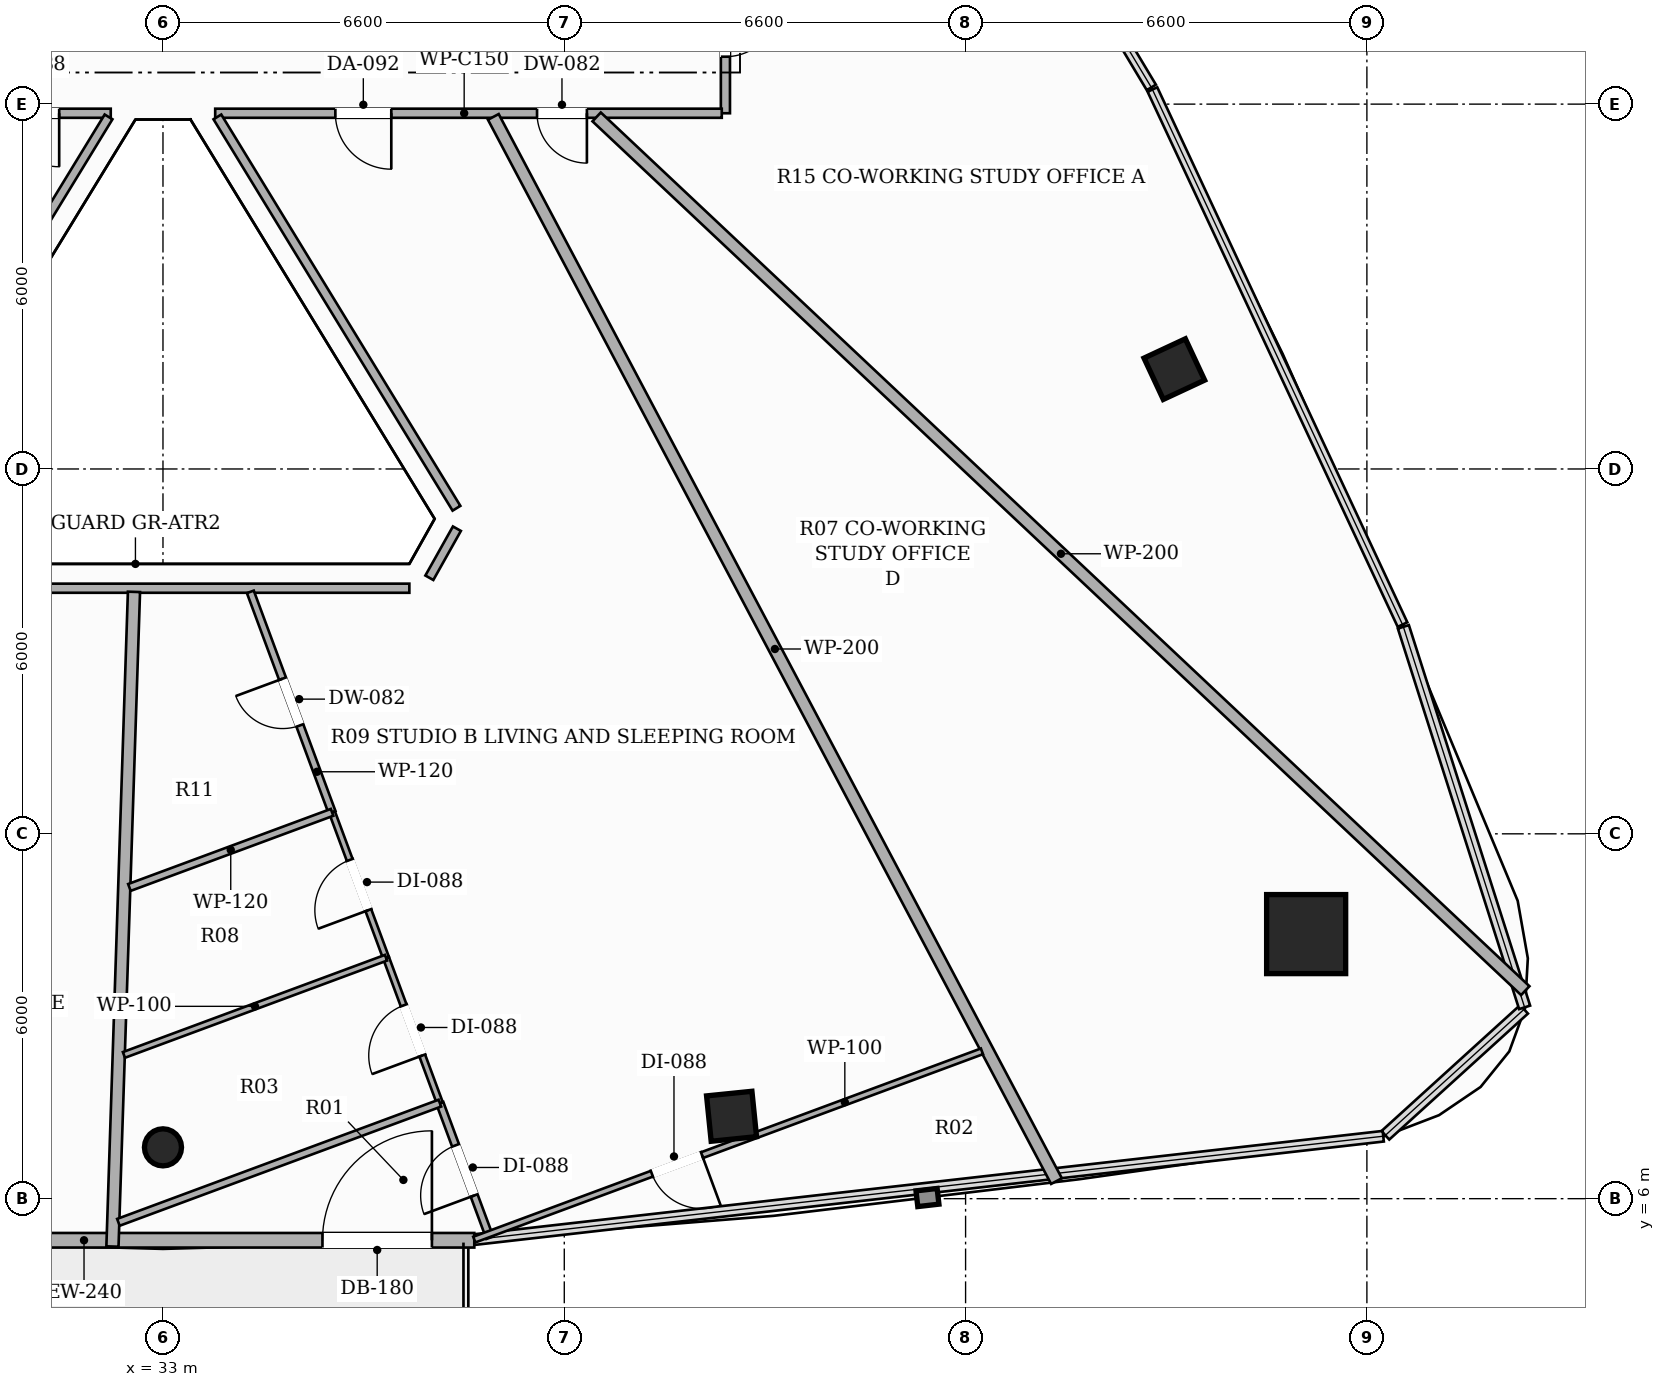
"""IFC4 building model, lengths in metres.
Left out: names, types, materials, properties, quantities, classifications, styles, units other than length and angle.
Written with IfcOpenShell. Run it as: python <this file> out.ifc"""

import sys

from ifc_helpers import new_model, si_unit, direction, frame, frame_2d, origin, origin_2d, place, context, subcontext, project, spatial, rectangle, hollow_rectangle, hollow_circle, extrude, element, fill, save


model = new_model("IFC4")
c1 = context("Model", 3, precision=1e-05, world=origin(), true_north=direction((0.0, 1.0)))
c2 = subcontext(c1, "Body", "Model", "MODEL_VIEW")
j1 = project(units=[si_unit("LENGTHUNIT", "METRE"), si_unit("PLANEANGLEUNIT", "RADIAN")], contexts=[c1])
p1 = place(None, origin())
s1 = spatial("IfcSite", under=j1, at=p1, CompositionType="ELEMENT")
p2 = place(p1, origin())
s2 = spatial("IfcBuilding", under=s1, at=p2, CompositionType="ELEMENT")
p3 = place(p2, frame((0.0, 0.0, 240.35)))
s3 = spatial("IfcBuildingStorey", under=s2, at=p3, CompositionType="ELEMENT", Elevation=240.35)
p4 = place(p3, frame((51.801, 10.351, 0.0), z_axis=(0.0, 0.0, 1.0), x_axis=(1.0, 0.0, 0.0)))
e1 = element("IfcColumn", 1, at=p4, inside=s3, PredefinedType="COLUMN", context=c2, shape_type="SweptSolid", body=[
    extrude(hollow_rectangle(XDim=1.3, YDim=1.3, WallThickness=0.04, at=origin_2d()), origin(), (0.0, 0.0, 1.0), 3.3),
])
p5 = place(p3, frame((33.0, 6.844, 0.0), z_axis=(0.0, 0.0, 1.0), x_axis=(1.0, 0.0, 0.0)))
e2 = element("IfcColumn", 2, at=p5, inside=s3, PredefinedType="COLUMN", context=c2, shape_type="SweptSolid", body=[
    extrude(hollow_circle(Radius=0.305, WallThickness=0.016, at=origin_2d()), origin(), (0.0, 0.0, 1.0), 3.3),
])
for number, where, z_axis, x_axis in (
    (3, (42.351, 7.355, 0.0), (0.0, 0.0, 1.0), (0.995, 0.101, 0.0)),
    (4, (49.633, 19.642, 0.0), (0.0, 0.0, 1.0), (-0.423, 0.906, 0.0)),
):
    element("IfcColumn", number, at=place(p3, frame(where, z_axis=z_axis, x_axis=x_axis)), inside=s3, PredefinedType="COLUMN", context=c2, shape_type="SweptSolid", body=[
        extrude(hollow_rectangle(XDim=0.75, YDim=0.75, WallThickness=0.025, at=origin_2d()), origin(), (0.0, 0.0, 1.0), 3.3),
    ])
p6 = place(p3, frame((27.88, 5.316, 0.0), z_axis=(0.0, 0.0, 1.0), x_axis=(1.0, 0.0, 0.0)))
e5 = element("IfcWall", 5, at=p6, inside=s3, PredefinedType="SOLIDWALL", context=c2, shape_type="SweptSolid", body=[
    extrude(rectangle(XDim=10.24, YDim=0.24, at=frame_2d((5.12, 0.0))), origin(), (0.0, 0.0, 1.0), 2.624),
])
p7 = place(p6, frame((7.743, 0.0, 0.0)))
e6 = element("IfcOpeningElement", 6, at=p7, cuts=e5, PredefinedType="OPENING", context=c2, shape_type="SweptSolid", body=[
    extrude(rectangle(XDim=1.8, YDim=2.2, at=frame_2d((0.9, 1.1))), frame((0.0, 0.13, 0.0), z_axis=(0.0, -1.0, 0.0), x_axis=(1.0, 0.0, 0.0)), (0.0, 0.0, 1.0), 0.26),
])
p8 = place(p3, frame((32.141, 23.85, 0.0), z_axis=(0.0, 0.0, 1.0), x_axis=(-1.0, 0.0, 0.0)))
e7 = element("IfcWall", 7, at=p8, inside=s3, PredefinedType="PARTITIONING", context=c2, shape_type="SweptSolid", body=[
    extrude(rectangle(XDim=8.491, YDim=0.15, at=frame_2d((4.246, 0.0))), origin(), (0.0, 0.0, 1.0), 2.565),
])
p9 = place(p8, frame((0.848, 0.0, 0.0)))
e8 = element("IfcOpeningElement", 8, at=p9, cuts=e7, PredefinedType="OPENING", context=c2, shape_type="SweptSolid", body=[
    extrude(rectangle(XDim=0.88, YDim=2.1, at=frame_2d((0.44, 1.05))), frame((0.0, 0.085, 0.0), z_axis=(0.0, -1.0, 0.0), x_axis=(1.0, 0.0, 0.0)), (0.0, 0.0, 1.0), 0.17),
])
p10 = place(p8, frame((2.616, 0.0, 0.0)))
e9 = element("IfcOpeningElement", 9, at=p10, cuts=e7, PredefinedType="OPENING", context=c2, shape_type="SweptSolid", body=[
    extrude(rectangle(XDim=0.88, YDim=2.1, at=frame_2d((0.44, 1.05))), frame((0.0, 0.085, 0.0), z_axis=(0.0, -1.0, 0.0), x_axis=(1.0, 0.0, 0.0)), (0.0, 0.0, 1.0), 0.17),
])
p11 = place(p8, frame((4.567, 0.0, 0.0)))
e10 = element("IfcOpeningElement", 10, at=p11, cuts=e7, PredefinedType="OPENING", context=c2, shape_type="SweptSolid", body=[
    extrude(rectangle(XDim=0.88, YDim=2.1, at=frame_2d((0.44, 1.05))), frame((0.0, 0.085, 0.0), z_axis=(0.0, -1.0, 0.0), x_axis=(1.0, 0.0, 0.0)), (0.0, 0.0, 1.0), 0.17),
])
p12 = place(p3, frame((42.25, 26.59, 0.0), z_axis=(0.0, 0.0, 1.0), x_axis=(0.0, -1.0, 0.0)))
e11 = element("IfcWall", 11, at=p12, inside=s3, PredefinedType="PARTITIONING", context=c2, shape_type="SweptSolid", body=[
    extrude(rectangle(XDim=2.74, YDim=0.15, at=frame_2d((1.37, 0.0))), origin(), (0.0, 0.0, 1.0), 2.773),
])
p13 = place(p12, frame((0.93, 0.0, 0.0)))
e12 = element("IfcOpeningElement", 12, at=p13, cuts=e11, PredefinedType="OPENING", context=c2, shape_type="SweptSolid", body=[
    extrude(rectangle(XDim=0.88, YDim=2.1, at=frame_2d((0.44, 1.05))), frame((0.0, 0.085, 0.0), z_axis=(0.0, -1.0, 0.0), x_axis=(1.0, 0.0, 0.0)), (0.0, 0.0, 1.0), 0.17),
])
p14 = place(p3, frame((42.19, 23.85, 0.0), z_axis=(0.0, 0.0, 1.0), x_axis=(-1.0, 0.0, 0.0)))
e13 = element("IfcWall", 13, at=p14, inside=s3, PredefinedType="PARTITIONING", context=c2, shape_type="SweptSolid", body=[
    extrude(rectangle(XDim=8.331, YDim=0.15, at=frame_2d((4.166, 0.0))), origin(), (0.0, 0.0, 1.0), 2.565),
])
p15 = place(p14, frame((5.435, 0.0, 0.0)))
e14 = element("IfcOpeningElement", 14, at=p15, cuts=e13, PredefinedType="OPENING", context=c2, shape_type="SweptSolid", body=[
    extrude(rectangle(XDim=0.92, YDim=2.15, at=frame_2d((0.46, 1.075))), frame((0.0, 0.085, 0.0), z_axis=(0.0, -1.0, 0.0), x_axis=(1.0, 0.0, 0.0)), (0.0, 0.0, 1.0), 0.17),
])
p16 = place(p14, frame((2.218, 0.0, 0.0)))
e15 = element("IfcOpeningElement", 15, at=p16, cuts=e13, PredefinedType="OPENING", context=c2, shape_type="SweptSolid", body=[
    extrude(rectangle(XDim=0.82, YDim=2.1, at=frame_2d((0.41, 1.05))), frame((0.0, 0.085, 0.0), z_axis=(0.0, -1.0, 0.0), x_axis=(1.0, 0.0, 0.0)), (0.0, 0.0, 1.0), 0.17),
])
p17 = place(p3, frame((33.895, 23.79, 0.0), z_axis=(0.0, 0.0, 1.0), x_axis=(0.521329541742, -0.85335544113, 0.0)))
e16 = element("IfcWall", 16, at=p17, inside=s3, PredefinedType="PARTITIONING", context=c2, shape_type="SweptSolid", body=[
    extrude(rectangle(XDim=7.542, YDim=0.15, at=frame_2d((3.771, 0.0))), origin(), (0.0, 0.0, 1.0), 2.773),
])
p18 = place(p3, frame((37.834, 17.018, 0.0), z_axis=(0.0, 0.0, 1.0), x_axis=(-0.489334167997, -0.872096366252, 0.0)))
e17 = element("IfcWall", 17, at=p18, inside=s3, PredefinedType="PARTITIONING", context=c2, shape_type="SweptSolid", body=[
    extrude(rectangle(XDim=0.926, YDim=0.15, at=frame_2d((0.463, 0.0))), origin(), (0.0, 0.0, 1.0), 3.06),
])
p19 = place(p3, frame((37.052, 16.039, 0.0), z_axis=(0.0, 0.0, 1.0), x_axis=(-1.0, 0.0, 0.0)))
e18 = element("IfcWall", 18, at=p19, inside=s3, PredefinedType="PARTITIONING", context=c2, shape_type="SweptSolid", body=[
    extrude(rectangle(XDim=8.104, YDim=0.15, at=frame_2d((4.052, 0.0))), origin(), (0.0, 0.0, 1.0), 2.773),
])
p20 = place(p3, frame((28.173, 17.354, 0.0), z_axis=(0.0, 0.0, 1.0), x_axis=(0.521329541742, 0.85335544113, 0.0)))
e19 = element("IfcWall", 19, at=p20, inside=s3, PredefinedType="PARTITIONING", context=c2, shape_type="SweptSolid", body=[
    extrude(rectangle(XDim=7.542, YDim=0.15, at=frame_2d((3.771, 0.0))), origin(), (0.0, 0.0, 1.0), 2.773),
])
p21 = place(p3, frame((55.405, 9.421, 0.0), z_axis=(0.0, 0.0, 1.0), x_axis=(-0.728328495468, 0.685228139155, 0.0)))
e20 = element("IfcWall", 20, at=p21, inside=s3, PredefinedType="PARTITIONING", context=c2, shape_type="SweptSolid", body=[
    extrude(rectangle(XDim=20.97, YDim=0.2, at=frame_2d((10.485, 0.0))), origin(), (0.0, 0.0, 1.0), 2.492),
])
p22 = place(p3, frame((38.433, 23.79, 0.0), z_axis=(0.0, 0.0, 1.0), x_axis=(0.467759118023, -0.88385598799, 0.0)))
e21 = element("IfcWall", 21, at=p22, inside=s3, PredefinedType="PARTITIONING", context=c2, shape_type="SweptSolid", body=[
    extrude(rectangle(XDim=19.801, YDim=0.2, at=frame_2d((9.9, 0.0))), origin(), (0.0, 0.0, 1.0), 2.492),
])
p23 = place(p3, frame((32.169, 5.213, 0.0), z_axis=(0.0, 0.0, 1.0), x_axis=(0.032863548895, 0.999459847695, 0.0)))
e22 = element("IfcWall", 22, at=p23, inside=s3, PredefinedType="PARTITIONING", context=c2, shape_type="SweptSolid", body=[
    extrude(rectangle(XDim=10.772, YDim=0.2, at=frame_2d((5.386, 0.0))), origin(), (0.0, 0.0, 1.0), 2.492),
])
p24 = place(p3, frame((35.781, 12.353, 0.0), z_axis=(0.0, 0.0, 1.0), x_axis=(-0.347550810428, 0.937661151041, 0.0)))
e23 = element("IfcWall", 23, at=p24, inside=s3, PredefinedType="PARTITIONING", context=c2, shape_type="SweptSolid", body=[
    extrude(rectangle(XDim=3.867, YDim=0.12, at=frame_2d((1.934, 0.0))), origin(), (0.0, 0.0, 1.0), 3.06),
])
p25 = place(p24, frame((1.524, 0.0, 0.0)))
e24 = element("IfcOpeningElement", 24, at=p25, cuts=e23, PredefinedType="OPENING", context=c2, shape_type="SweptSolid", body=[
    extrude(rectangle(XDim=0.82, YDim=2.1, at=frame_2d((0.41, 1.05))), frame((0.0, 0.07, 0.0), z_axis=(0.0, -1.0, 0.0), x_axis=(1.0, 0.0, 0.0)), (0.0, 0.0, 1.0), 0.14),
])
p26 = place(p3, frame((38.375, 5.358, 0.0), z_axis=(0.0, 0.0, 1.0), x_axis=(-0.347822952978, 0.937560234535, 0.0)))
e25 = element("IfcWall", 25, at=p26, inside=s3, PredefinedType="PARTITIONING", context=c2, shape_type="SweptSolid", body=[
    extrude(rectangle(XDim=2.361, YDim=0.12, at=frame_2d((1.18, 0.0))), origin(), (0.0, 0.0, 1.0), 2.492),
])
p27 = place(p26, frame((0.74, 0.0, 0.0)))
e26 = element("IfcOpeningElement", 26, at=p27, cuts=e25, PredefinedType="OPENING", context=c2, shape_type="SweptSolid", body=[
    extrude(rectangle(XDim=0.88, YDim=2.1, at=frame_2d((0.44, 1.05))), frame((0.0, 0.07, 0.0), z_axis=(0.0, -1.0, 0.0), x_axis=(1.0, 0.0, 0.0)), (0.0, 0.0, 1.0), 0.14),
])
p28 = place(p3, frame((37.554, 7.571, 0.0), z_axis=(0.0, 0.0, 1.0), x_axis=(-0.347479633163, 0.93768753033, 0.0)))
e27 = element("IfcWall", 27, at=p28, inside=s3, PredefinedType="PARTITIONING", context=c2, shape_type="SweptSolid", body=[
    extrude(rectangle(XDim=2.55, YDim=0.1, at=frame_2d((1.275, 0.0))), origin(), (0.0, 0.0, 1.0), 2.773),
])
p29 = place(p28, frame((0.835, 0.0, 0.0)))
e28 = element("IfcOpeningElement", 28, at=p29, cuts=e27, PredefinedType="OPENING", context=c2, shape_type="SweptSolid", body=[
    extrude(rectangle(XDim=0.88, YDim=2.1, at=frame_2d((0.44, 1.05))), frame((0.0, 0.06, 0.0), z_axis=(0.0, -1.0, 0.0), x_axis=(1.0, 0.0, 0.0)), (0.0, 0.0, 1.0), 0.12),
])
p30 = place(p3, frame((46.469, 8.423, 0.0), z_axis=(0.0, 0.0, 1.0), x_axis=(-0.937601832004, -0.34771080602, 0.0)))
e29 = element("IfcWall", 29, at=p30, inside=s3, PredefinedType="PARTITIONING", context=c2, shape_type="SweptSolid", body=[
    extrude(rectangle(XDim=8.905, YDim=0.1, at=frame_2d((4.452, 0.0))), origin(), (0.0, 0.0, 1.0), 2.492),
])
p31 = place(p30, frame((4.91, 0.0, 0.0)))
e30 = element("IfcOpeningElement", 30, at=p31, cuts=e29, PredefinedType="OPENING", context=c2, shape_type="SweptSolid", body=[
    extrude(rectangle(XDim=0.88, YDim=2.1, at=frame_2d((0.44, 1.05))), frame((0.0, 0.06, 0.0), z_axis=(0.0, -1.0, 0.0), x_axis=(1.0, 0.0, 0.0)), (0.0, 0.0, 1.0), 0.12),
])
p32 = place(p3, frame((36.668, 9.962, 0.0), z_axis=(0.0, 0.0, 1.0), x_axis=(-0.347785106968, 0.937574274056, 0.0)))
e31 = element("IfcWall", 31, at=p32, inside=s3, PredefinedType="PARTITIONING", context=c2, shape_type="SweptSolid", body=[
    extrude(rectangle(XDim=2.55, YDim=0.1, at=frame_2d((1.275, 0.0))), origin(), (0.0, 0.0, 1.0), 3.06),
])
p33 = place(p32, frame((0.835, 0.0, 0.0)))
e32 = element("IfcOpeningElement", 32, at=p33, cuts=e31, PredefinedType="OPENING", context=c2, shape_type="SweptSolid", body=[
    extrude(rectangle(XDim=0.88, YDim=2.1, at=frame_2d((0.44, 1.05))), frame((0.0, 0.06, 0.0), z_axis=(0.0, -1.0, 0.0), x_axis=(1.0, 0.0, 0.0)), (0.0, 0.0, 1.0), 0.12),
])
p34 = place(p3, frame((35.781, 12.353, 0.0), z_axis=(0.0, 0.0, 1.0), x_axis=(-0.937688263894, -0.347477653607, 0.0)))
e33 = element("IfcWall", 33, at=p34, inside=s3, PredefinedType="PARTITIONING", context=c2, shape_type="SweptSolid", body=[
    extrude(rectangle(XDim=3.554, YDim=0.12, at=frame_2d((1.777, 0.0))), origin(), (0.0, 0.0, 1.0), 2.773),
])
p35 = place(p3, frame((32.267, 5.611, 0.0), z_axis=(0.0, 0.0, 1.0), x_axis=(0.937641120959, 0.347604845027, 0.0)))
e34 = element("IfcWall", 34, at=p35, inside=s3, PredefinedType="PARTITIONING", context=c2, shape_type="SweptSolid", body=[
    extrude(rectangle(XDim=5.638, YDim=0.12, at=frame_2d((2.819, 0.0))), origin(), (0.0, 0.0, 1.0), 2.492),
])
p36 = place(p3, frame((32.358, 8.364, 0.0), z_axis=(0.0, 0.0, 1.0), x_axis=(0.937636593966, 0.34761705605, 0.0)))
e35 = element("IfcWall", 35, at=p36, inside=s3, PredefinedType="PARTITIONING", context=c2, shape_type="SweptSolid", body=[
    extrude(rectangle(XDim=4.597, YDim=0.1, at=frame_2d((2.298, 0.0))), origin(), (0.0, 0.0, 1.0), 2.773),
])
p37 = place(p7, origin())
e36 = element("IfcDoor", 36, at=p37, inside=s3, OperationType="SINGLE_SWING_RIGHT", PredefinedType="DOOR", context=c2, shape_type="SweptSolid", body=[
    extrude(rectangle(XDim=1.8, YDim=2.2, at=frame_2d((0.9, 1.1))), frame((0.0, 0.025, 0.0), z_axis=(0.0, -1.0, 0.0), x_axis=(1.0, 0.0, 0.0)), (0.0, 0.0, 1.0), 0.05),
])
fill(e6, e36)
p38 = place(p13, origin())
e37 = element("IfcDoor", 37, at=p38, inside=s3, OperationType="SINGLE_SWING_LEFT", PredefinedType="DOOR", context=c2, shape_type="SweptSolid", body=[
    extrude(rectangle(XDim=0.88, YDim=2.1, at=frame_2d((0.44, 1.05))), frame((0.0, 0.025, 0.0), z_axis=(0.0, -1.0, 0.0), x_axis=(1.0, 0.0, 0.0)), (0.0, 0.0, 1.0), 0.05),
])
fill(e12, e37)
p39 = place(p15, origin())
e38 = element("IfcDoor", 38, at=p39, inside=s3, OperationType="SINGLE_SWING_LEFT", PredefinedType="DOOR", context=c2, shape_type="SweptSolid", body=[
    extrude(rectangle(XDim=0.92, YDim=2.15, at=frame_2d((0.46, 1.075))), frame((0.0, 0.025, 0.0), z_axis=(0.0, -1.0, 0.0), x_axis=(1.0, 0.0, 0.0)), (0.0, 0.0, 1.0), 0.05),
])
fill(e14, e38)
p40 = place(p25, origin())
e39 = element("IfcDoor", 39, at=p40, inside=s3, OperationType="SINGLE_SWING_RIGHT", PredefinedType="DOOR", context=c2, shape_type="SweptSolid", body=[
    extrude(rectangle(XDim=0.82, YDim=2.1, at=frame_2d((0.41, 1.05))), frame((0.0, 0.025, 0.0), z_axis=(0.0, -1.0, 0.0), x_axis=(1.0, 0.0, 0.0)), (0.0, 0.0, 1.0), 0.05),
])
fill(e24, e39)
p41 = place(p27, origin())
e40 = element("IfcDoor", 40, at=p41, inside=s3, OperationType="SINGLE_SWING_LEFT", PredefinedType="DOOR", context=c2, shape_type="SweptSolid", body=[
    extrude(rectangle(XDim=0.88, YDim=2.1, at=frame_2d((0.44, 1.05))), frame((0.0, 0.025, 0.0), z_axis=(0.0, -1.0, 0.0), x_axis=(1.0, 0.0, 0.0)), (0.0, 0.0, 1.0), 0.05),
])
fill(e26, e40)
p42 = place(p29, origin())
e41 = element("IfcDoor", 41, at=p42, inside=s3, OperationType="SINGLE_SWING_LEFT", PredefinedType="DOOR", context=c2, shape_type="SweptSolid", body=[
    extrude(rectangle(XDim=0.88, YDim=2.1, at=frame_2d((0.44, 1.05))), frame((0.0, 0.025, 0.0), z_axis=(0.0, -1.0, 0.0), x_axis=(1.0, 0.0, 0.0)), (0.0, 0.0, 1.0), 0.05),
])
fill(e28, e41)
p43 = place(p31, origin())
e42 = element("IfcDoor", 42, at=p43, inside=s3, OperationType="SINGLE_SWING_LEFT", PredefinedType="DOOR", context=c2, shape_type="SweptSolid", body=[
    extrude(rectangle(XDim=0.88, YDim=2.1, at=frame_2d((0.44, 1.05))), frame((0.0, 0.025, 0.0), z_axis=(0.0, -1.0, 0.0), x_axis=(1.0, 0.0, 0.0)), (0.0, 0.0, 1.0), 0.05),
])
fill(e30, e42)
p44 = place(p33, origin())
e43 = element("IfcDoor", 43, at=p44, inside=s3, OperationType="SINGLE_SWING_LEFT", PredefinedType="DOOR", context=c2, shape_type="SweptSolid", body=[
    extrude(rectangle(XDim=0.88, YDim=2.1, at=frame_2d((0.44, 1.05))), frame((0.0, 0.025, 0.0), z_axis=(0.0, -1.0, 0.0), x_axis=(1.0, 0.0, 0.0)), (0.0, 0.0, 1.0), 0.05),
])
fill(e32, e43)
p45 = place(p16, origin())
e44 = element("IfcDoor", 44, at=p45, inside=s3, OperationType="SINGLE_SWING_LEFT", PredefinedType="DOOR", context=c2, shape_type="SweptSolid", body=[
    extrude(rectangle(XDim=0.82, YDim=2.1, at=frame_2d((0.41, 1.05))), frame((0.0, 0.025, 0.0), z_axis=(0.0, -1.0, 0.0), x_axis=(1.0, 0.0, 0.0)), (0.0, 0.0, 1.0), 0.05),
])
fill(e15, e44)
p46 = place(p9, origin())
e45 = element("IfcDoor", 45, at=p46, inside=s3, OperationType="SINGLE_SWING_LEFT", PredefinedType="DOOR", context=c2, shape_type="SweptSolid", body=[
    extrude(rectangle(XDim=0.88, YDim=2.1, at=frame_2d((0.44, 1.05))), frame((0.0, 0.025, 0.0), z_axis=(0.0, -1.0, 0.0), x_axis=(1.0, 0.0, 0.0)), (0.0, 0.0, 1.0), 0.05),
])
fill(e8, e45)
save(model, sys.argv[1])
